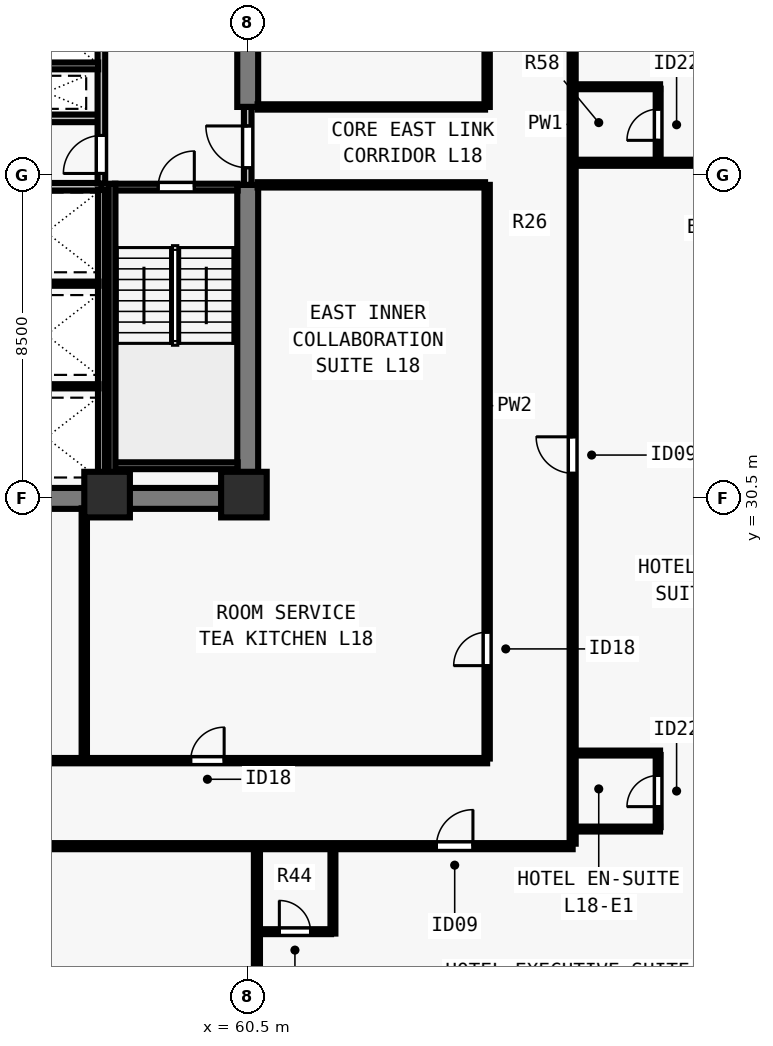
"""IFC4 building model, lengths in metres.
Left out: names, types, materials, properties, quantities, classifications, styles, units other than length and angle.
Written with IfcOpenShell. Run it as: python <this file> out.ifc"""

import sys

from ifc_helpers import new_model, si_unit, direction, frame, frame_2d, origin, origin_2d, place, context, subcontext, project, spatial, rectangle, extrude, element, fill, save


model = new_model("IFC4")
c1 = context("Model", 3, precision=1e-05, world=origin(), true_north=direction((0.0, 1.0)))
c2 = subcontext(c1, "Body", "Model", "MODEL_VIEW")
j1 = project(units=[si_unit("LENGTHUNIT", "METRE"), si_unit("PLANEANGLEUNIT", "RADIAN")], contexts=[c1])
p1 = place(None, origin())
s1 = spatial("IfcSite", under=j1, at=p1, CompositionType="ELEMENT")
p2 = place(p1, origin())
s2 = spatial("IfcBuilding", under=s1, at=p2, CompositionType="ELEMENT")
p3 = place(p2, frame((0.0, 0.0, 69.0)))
s3 = spatial("IfcBuildingStorey", under=s2, at=p3, CompositionType="ELEMENT", Elevation=69.0)
for number, where, z_axis, x_axis in (
    (1, (56.8, 30.6, 0.0), (0.0, 0.0, 1.0), (1.0, 0.0, 0.0)),
    (2, (60.4, 30.6, 0.0), (0.0, 0.0, 1.0), (1.0, 0.0, 0.0)),
):
    element("IfcColumn", number, at=place(p3, frame(where, z_axis=z_axis, x_axis=x_axis)), inside=s3, PredefinedType="COLUMN", context=c2, shape_type="SweptSolid", body=[
        extrude(rectangle(XDim=1.2, YDim=1.2, at=origin_2d()), origin(), (0.0, 0.0, 1.0), 3.5),
    ])
p4 = place(p3, frame((43.225, 30.5, 0.0), z_axis=(0.0, 0.0, 1.0), x_axis=(1.0, 0.0, 0.0)))
e3 = element("IfcWall", 3, at=p4, inside=s3, PredefinedType="SHEAR", context=c2, shape_type="SweptSolid", body=[
    extrude(rectangle(XDim=17.55, YDim=0.55, at=frame_2d((8.775, 0.0))), origin(), (0.0, 0.0, 1.0), 3.28),
])
p5 = place(p3, frame((60.5, 30.765, 0.0), z_axis=(0.0, 0.0, 1.0), x_axis=(0.0, 1.0, 0.0)))
e4 = element("IfcWall", 4, at=p5, inside=s3, PredefinedType="SHEAR", context=c2, shape_type="SweptSolid", body=[
    extrude(rectangle(XDim=7.985, YDim=0.55, at=frame_2d((3.993, 0.0))), origin(), (0.0, 0.0, 1.0), 3.28),
])
p6 = place(p3, frame((60.5, 40.8, 0.0), z_axis=(0.0, 0.0, 1.0), x_axis=(0.0, 1.0, 0.0)))
e5 = element("IfcWall", 5, at=p6, inside=s3, PredefinedType="SHEAR", context=c2, shape_type="SweptSolid", body=[
    extrude(rectangle(XDim=6.435, YDim=0.55, at=frame_2d((3.218, 0.0))), origin(), (0.0, 0.0, 1.0), 3.28),
])
for number, where, z_axis, x_axis in (
    (6, (53.7, 38.7, 0.0), (0.0, 0.0, 1.0), (1.0, 0.0, 0.0)),
    (7, (53.7, 40.5, 0.0), (0.0, 0.0, 1.0), (1.0, 0.0, 0.0)),
):
    element("IfcWall", number, at=place(p3, frame(where, z_axis=z_axis, x_axis=x_axis)), inside=s3, PredefinedType="SOLIDWALL", context=c2, shape_type="SweptSolid", body=[
        extrude(rectangle(XDim=2.95, YDim=0.2, at=frame_2d((1.475, 0.0))), origin(), (0.0, 0.0, 1.0), 3.28),
    ])
p7 = place(p3, frame((60.5, 38.75, 0.0), z_axis=(0.0, 0.0, 1.0), x_axis=(0.0, 1.0, 0.0)))
e8 = element("IfcWall", 8, at=p7, inside=s3, PredefinedType="SOLIDWALL", context=c2, shape_type="SweptSolid", body=[
    extrude(rectangle(XDim=2.05, YDim=0.2, at=frame_2d((1.025, 0.0))), origin(), (0.0, 0.0, 1.0), 3.28),
])
p8 = place(p7, frame((0.45, 0.0, 0.0)))
e9 = element("IfcOpeningElement", 9, at=p8, cuts=e8, PredefinedType="OPENING", context=c2, shape_type="SweptSolid", body=[
    extrude(rectangle(XDim=1.1, YDim=2.15, at=frame_2d((0.55, 1.075))), frame((0.0, 0.11, 0.0), z_axis=(0.0, -1.0, 0.0), x_axis=(1.0, 0.0, 0.0)), (0.0, 0.0, 1.0), 0.22),
])
p9 = place(p3, frame((56.65, 38.785, 0.0), z_axis=(0.0, 0.0, 1.0), x_axis=(0.0, 1.0, 0.0)))
e10 = element("IfcWall", 10, at=p9, inside=s3, PredefinedType="SOLIDWALL", context=c2, shape_type="SweptSolid", body=[
    extrude(rectangle(XDim=4.865, YDim=0.2, at=frame_2d((2.433, 0.0))), origin(), (0.0, 0.0, 1.0), 3.28),
])
p10 = place(p9, frame((0.265, 0.0, 0.0)))
e11 = element("IfcOpeningElement", 11, at=p10, cuts=e10, PredefinedType="OPENING", context=c2, shape_type="SweptSolid", body=[
    extrude(rectangle(XDim=1.0, YDim=2.15, at=frame_2d((0.5, 1.075))), frame((0.0, 0.11, 0.0), z_axis=(0.0, -1.0, 0.0), x_axis=(1.0, 0.0, 0.0)), (0.0, 0.0, 1.0), 0.22),
])
p11 = place(p3, frame((56.65, 30.76, 0.0), z_axis=(0.0, 0.0, 1.0), x_axis=(0.0, 1.0, 0.0)))
e12 = element("IfcWall", 12, at=p11, inside=s3, PredefinedType="SOLIDWALL", context=c2, shape_type="SweptSolid", body=[
    extrude(rectangle(XDim=7.855, YDim=0.18, at=frame_2d((3.927, 0.0))), origin(), (0.0, 0.0, 1.0), 3.28),
])
for number, where, z_axis, x_axis in (
    (13, (53.785, 33.45, 0.0), (0.0, 0.0, 1.0), (1.0, 0.0, 0.0)),
    (14, (53.785, 36.15, 0.0), (0.0, 0.0, 1.0), (1.0, 0.0, 0.0)),
):
    element("IfcWall", number, at=place(p3, frame(where, z_axis=z_axis, x_axis=x_axis)), inside=s3, PredefinedType="PARTITIONING", context=c2, shape_type="SweptSolid", body=[
        extrude(rectangle(XDim=2.79, YDim=0.11, at=frame_2d((1.395, 0.0))), origin(), (0.0, 0.0, 1.0), 3.28),
    ])
p12 = place(p3, frame((53.785, 41.88, 0.0), z_axis=(0.0, 0.0, 1.0), x_axis=(1.0, 0.0, 0.0)))
e15 = element("IfcWall", 15, at=p12, inside=s3, PredefinedType="SOLIDWALL", context=c2, shape_type="SweptSolid", body=[
    extrude(rectangle(XDim=2.78, YDim=0.18, at=frame_2d((1.39, 0.0))), origin(), (0.0, 0.0, 1.0), 3.28),
])
p13 = place(p3, frame((34.95, 21.35, 0.0), z_axis=(0.0, 0.0, 1.0), x_axis=(1.0, 0.0, 0.0)))
e16 = element("IfcWall", 16, at=p13, inside=s3, PredefinedType="PARTITIONING", context=c2, shape_type="SweptSolid", body=[
    extrude(rectangle(XDim=34.1, YDim=0.16, at=frame_2d((17.05, 0.0))), origin(), (0.0, 0.0, 1.0), 3.28),
])
p14 = place(p13, frame((3.614, 0.0, 0.0)))
e17 = element("IfcOpeningElement", 17, at=p14, cuts=e16, PredefinedType="OPENING", context=c2, shape_type="SweptSolid", body=[
    extrude(rectangle(XDim=0.96, YDim=2.15, at=frame_2d((0.48, 1.075))), frame((0.0, 0.09, 0.0), z_axis=(0.0, -1.0, 0.0), x_axis=(1.0, 0.0, 0.0)), (0.0, 0.0, 1.0), 0.18),
])
p15 = place(p13, frame((17.56, 0.0, 0.0)))
e18 = element("IfcOpeningElement", 18, at=p15, cuts=e16, PredefinedType="OPENING", context=c2, shape_type="SweptSolid", body=[
    extrude(rectangle(XDim=0.96, YDim=2.15, at=frame_2d((0.48, 1.075))), frame((0.0, 0.09, 0.0), z_axis=(0.0, -1.0, 0.0), x_axis=(1.0, 0.0, 0.0)), (0.0, 0.0, 1.0), 0.18),
])
p16 = place(p13, frame((30.516, 0.0, 0.0)))
e19 = element("IfcOpeningElement", 19, at=p16, cuts=e16, PredefinedType="OPENING", context=c2, shape_type="SweptSolid", body=[
    extrude(rectangle(XDim=0.96, YDim=2.15, at=frame_2d((0.48, 1.075))), frame((0.0, 0.09, 0.0), z_axis=(0.0, -1.0, 0.0), x_axis=(1.0, 0.0, 0.0)), (0.0, 0.0, 1.0), 0.18),
])
p17 = place(p3, frame((69.05, 21.415, 0.0), z_axis=(0.0, 0.0, 1.0), x_axis=(0.0, 1.0, 0.0)))
e20 = element("IfcWall", 20, at=p17, inside=s3, PredefinedType="PARTITIONING", context=c2, shape_type="SweptSolid", body=[
    extrude(rectangle(XDim=35.17, YDim=0.16, at=frame_2d((17.585, 0.0))), origin(), (0.0, 0.0, 1.0), 3.28),
])
p18 = place(p17, frame((9.746, 0.0, 0.0)))
e21 = element("IfcOpeningElement", 21, at=p18, cuts=e20, PredefinedType="OPENING", context=c2, shape_type="SweptSolid", body=[
    extrude(rectangle(XDim=0.96, YDim=2.15, at=frame_2d((0.48, 1.075))), frame((0.0, 0.09, 0.0), z_axis=(0.0, -1.0, 0.0), x_axis=(1.0, 0.0, 0.0)), (0.0, 0.0, 1.0), 0.18),
])
p19 = place(p17, frame((27.146, 0.0, 0.0)))
e22 = element("IfcOpeningElement", 22, at=p19, cuts=e20, PredefinedType="OPENING", context=c2, shape_type="SweptSolid", body=[
    extrude(rectangle(XDim=0.96, YDim=2.15, at=frame_2d((0.48, 1.075))), frame((0.0, 0.09, 0.0), z_axis=(0.0, -1.0, 0.0), x_axis=(1.0, 0.0, 0.0)), (0.0, 0.0, 1.0), 0.18),
])
p20 = place(p3, frame((37.2, 23.6, 0.0), z_axis=(0.0, 0.0, 1.0), x_axis=(1.0, 0.0, 0.0)))
e23 = element("IfcWall", 23, at=p20, inside=s3, PredefinedType="PARTITIONING", context=c2, shape_type="SweptSolid", body=[
    extrude(rectangle(XDim=29.6, YDim=0.14, at=frame_2d((14.8, 0.0))), origin(), (0.0, 0.0, 1.0), 3.28),
])
p21 = place(p20, frame((1.2, 0.0, 0.0)))
e24 = element("IfcOpeningElement", 24, at=p21, cuts=e23, PredefinedType="OPENING", context=c2, shape_type="SweptSolid", body=[
    extrude(rectangle(XDim=0.88, YDim=2.1, at=frame_2d((0.44, 1.05))), frame((0.0, 0.08, 0.0), z_axis=(0.0, -1.0, 0.0), x_axis=(1.0, 0.0, 0.0)), (0.0, 0.0, 1.0), 0.16),
])
p22 = place(p20, frame((11.3, 0.0, 0.0)))
e25 = element("IfcOpeningElement", 25, at=p22, cuts=e23, PredefinedType="OPENING", context=c2, shape_type="SweptSolid", body=[
    extrude(rectangle(XDim=0.88, YDim=2.1, at=frame_2d((0.44, 1.05))), frame((0.0, 0.08, 0.0), z_axis=(0.0, -1.0, 0.0), x_axis=(1.0, 0.0, 0.0)), (0.0, 0.0, 1.0), 0.16),
])
p23 = place(p20, frame((21.8, 0.0, 0.0)))
e26 = element("IfcOpeningElement", 26, at=p23, cuts=e23, PredefinedType="OPENING", context=c2, shape_type="SweptSolid", body=[
    extrude(rectangle(XDim=0.88, YDim=2.1, at=frame_2d((0.44, 1.05))), frame((0.0, 0.08, 0.0), z_axis=(0.0, -1.0, 0.0), x_axis=(1.0, 0.0, 0.0)), (0.0, 0.0, 1.0), 0.16),
])
p24 = place(p3, frame((66.8, 23.655, 0.0), z_axis=(0.0, 0.0, 1.0), x_axis=(0.0, 1.0, 0.0)))
e27 = element("IfcWall", 27, at=p24, inside=s3, PredefinedType="PARTITIONING", context=c2, shape_type="SweptSolid", body=[
    extrude(rectangle(XDim=15.095, YDim=0.14, at=frame_2d((7.547, 0.0))), origin(), (0.0, 0.0, 1.0), 3.28),
])
p25 = place(p24, frame((2.445, 0.0, 0.0)))
e28 = element("IfcOpeningElement", 28, at=p25, cuts=e27, PredefinedType="OPENING", context=c2, shape_type="SweptSolid", body=[
    extrude(rectangle(XDim=0.88, YDim=2.1, at=frame_2d((0.44, 1.05))), frame((0.0, 0.08, 0.0), z_axis=(0.0, -1.0, 0.0), x_axis=(1.0, 0.0, 0.0)), (0.0, 0.0, 1.0), 0.16),
])
p26 = place(p3, frame((66.8, 40.8, 0.0), z_axis=(0.0, 0.0, 1.0), x_axis=(0.0, 1.0, 0.0)))
e29 = element("IfcWall", 29, at=p26, inside=s3, PredefinedType="PARTITIONING", context=c2, shape_type="SweptSolid", body=[
    extrude(rectangle(XDim=13.545, YDim=0.14, at=frame_2d((6.772, 0.0))), origin(), (0.0, 0.0, 1.0), 3.28),
])
p27 = place(p26, frame((2.5, 0.0, 0.0)))
e30 = element("IfcOpeningElement", 30, at=p27, cuts=e29, PredefinedType="OPENING", context=c2, shape_type="SweptSolid", body=[
    extrude(rectangle(XDim=0.88, YDim=2.1, at=frame_2d((0.44, 1.05))), frame((0.0, 0.08, 0.0), z_axis=(0.0, -1.0, 0.0), x_axis=(1.0, 0.0, 0.0)), (0.0, 0.0, 1.0), 0.16),
])
for number, where, z_axis, x_axis in (
    (31, (60.76, 38.75, 0.0), (0.0, 0.0, 1.0), (1.0, 0.0, 0.0)),
    (32, (60.76, 40.8, 0.0), (0.0, 0.0, 1.0), (1.0, 0.0, 0.0)),
):
    element("IfcWall", number, at=place(p3, frame(where, z_axis=z_axis, x_axis=x_axis)), inside=s3, PredefinedType="PARTITIONING", context=c2, shape_type="SweptSolid", body=[
        extrude(rectangle(XDim=5.985, YDim=0.14, at=frame_2d((2.993, 0.0))), origin(), (0.0, 0.0, 1.0), 3.28),
    ])
p28 = place(p3, frame((56.2, 23.655, 0.0), z_axis=(0.0, 0.0, 1.0), x_axis=(0.0, 1.0, 0.0)))
e33 = element("IfcWall", 33, at=p28, inside=s3, PredefinedType="PARTITIONING", context=c2, shape_type="SweptSolid", body=[
    extrude(rectangle(XDim=6.585, YDim=0.14, at=frame_2d((3.292, 0.0))), origin(), (0.0, 0.0, 1.0), 2.849),
])
p29 = place(p3, frame((60.742, 13.845, 0.0), z_axis=(0.0, 0.0, 1.0), x_axis=(0.0, 1.0, 0.0)))
e34 = element("IfcWall", 34, at=p29, inside=s3, PredefinedType="PARTITIONING", context=c2, shape_type="SweptSolid", body=[
    extrude(rectangle(XDim=7.44, YDim=0.16, at=frame_2d((3.72, 0.0))), origin(), (0.0, 0.0, 1.0), 3.28),
])
p30 = place(p3, frame((62.742, 19.05, 0.0), z_axis=(0.0, 0.0, 1.0), x_axis=(0.0, 1.0, 0.0)))
e35 = element("IfcWall", 35, at=p30, inside=s3, PredefinedType="PLUMBINGWALL", context=c2, shape_type="SweptSolid", body=[
    extrude(rectangle(XDim=2.235, YDim=0.13, at=frame_2d((1.117, 0.0))), origin(), (0.0, 0.0, 1.0), 3.28),
])
p31 = place(p3, frame((60.808, 19.1, 0.0), z_axis=(0.0, 0.0, 1.0), x_axis=(1.0, 0.0, 0.0)))
e36 = element("IfcWall", 36, at=p31, inside=s3, PredefinedType="PLUMBINGWALL", context=c2, shape_type="SweptSolid", body=[
    extrude(rectangle(XDim=1.885, YDim=0.13, at=frame_2d((0.942, 0.0))), origin(), (0.0, 0.0, 1.0), 3.28),
])
p32 = place(p31, frame((0.525, 0.0, 0.0)))
e37 = element("IfcOpeningElement", 37, at=p32, cuts=e36, PredefinedType="OPENING", context=c2, shape_type="SweptSolid", body=[
    extrude(rectangle(XDim=0.82, YDim=2.1, at=frame_2d((0.41, 1.05))), frame((0.0, 0.075, 0.0), z_axis=(0.0, -1.0, 0.0), x_axis=(1.0, 0.0, 0.0)), (0.0, 0.0, 1.0), 0.15),
])
p33 = place(p3, frame((69.115, 21.8, 0.0), z_axis=(0.0, 0.0, 1.0), x_axis=(1.0, 0.0, 0.0)))
e38 = element("IfcWall", 38, at=p33, inside=s3, PredefinedType="PLUMBINGWALL", context=c2, shape_type="SweptSolid", body=[
    extrude(rectangle(XDim=2.235, YDim=0.13, at=frame_2d((1.118, 0.0))), origin(), (0.0, 0.0, 1.0), 2.849),
])
p34 = place(p3, frame((69.115, 23.8, 0.0), z_axis=(0.0, 0.0, 1.0), x_axis=(1.0, 0.0, 0.0)))
e39 = element("IfcWall", 39, at=p34, inside=s3, PredefinedType="PLUMBINGWALL", context=c2, shape_type="SweptSolid", body=[
    extrude(rectangle(XDim=2.235, YDim=0.13, at=frame_2d((1.118, 0.0))), origin(), (0.0, 0.0, 1.0), 3.28),
])
p35 = place(p3, frame((71.3, 21.85, 0.0), z_axis=(0.0, 0.0, 1.0), x_axis=(0.0, 1.0, 0.0)))
e40 = element("IfcWall", 40, at=p35, inside=s3, PredefinedType="PLUMBINGWALL", context=c2, shape_type="SweptSolid", body=[
    extrude(rectangle(XDim=1.9, YDim=0.13, at=frame_2d((0.95, 0.0))), origin(), (0.0, 0.0, 1.0), 3.28),
])
p36 = place(p35, frame((0.54, 0.0, 0.0)))
e41 = element("IfcOpeningElement", 41, at=p36, cuts=e40, PredefinedType="OPENING", context=c2, shape_type="SweptSolid", body=[
    extrude(rectangle(XDim=0.82, YDim=2.1, at=frame_2d((0.41, 1.05))), frame((0.0, 0.075, 0.0), z_axis=(0.0, -1.0, 0.0), x_axis=(1.0, 0.0, 0.0)), (0.0, 0.0, 1.0), 0.15),
])
p37 = place(p3, frame((69.115, 39.332, 0.0), z_axis=(0.0, 0.0, 1.0), x_axis=(1.0, 0.0, 0.0)))
e42 = element("IfcWall", 42, at=p37, inside=s3, PredefinedType="PARTITIONING", context=c2, shape_type="SweptSolid", body=[
    extrude(rectangle(XDim=8.115, YDim=0.16, at=frame_2d((4.058, 0.0))), origin(), (0.0, 0.0, 1.0), 3.28),
])
p38 = place(p3, frame((69.115, 41.332, 0.0), z_axis=(0.0, 0.0, 1.0), x_axis=(1.0, 0.0, 0.0)))
e43 = element("IfcWall", 43, at=p38, inside=s3, PredefinedType="PLUMBINGWALL", context=c2, shape_type="SweptSolid", body=[
    extrude(rectangle(XDim=2.235, YDim=0.13, at=frame_2d((1.118, 0.0))), origin(), (0.0, 0.0, 1.0), 3.28),
])
p39 = place(p3, frame((71.3, 39.396, 0.0), z_axis=(0.0, 0.0, 1.0), x_axis=(0.0, 1.0, 0.0)))
e44 = element("IfcWall", 44, at=p39, inside=s3, PredefinedType="PLUMBINGWALL", context=c2, shape_type="SweptSolid", body=[
    extrude(rectangle(XDim=1.885, YDim=0.13, at=frame_2d((0.942, 0.0))), origin(), (0.0, 0.0, 1.0), 3.28),
])
p40 = place(p39, frame((0.525, 0.0, 0.0)))
e45 = element("IfcOpeningElement", 45, at=p40, cuts=e44, PredefinedType="OPENING", context=c2, shape_type="SweptSolid", body=[
    extrude(rectangle(XDim=0.82, YDim=2.1, at=frame_2d((0.41, 1.05))), frame((0.0, 0.075, 0.0), z_axis=(0.0, -1.0, 0.0), x_axis=(1.0, 0.0, 0.0)), (0.0, 0.0, 1.0), 0.15),
])
p41 = place(p3, frame((57.005, 38.69, 0.0), z_axis=(0.0, 0.0, 1.0), x_axis=(1.0, 0.0, 0.0)))
e46 = element("IfcWall", 46, at=p41, inside=s3, PredefinedType="SOLIDWALL", context=c2, shape_type="SweptSolid", body=[
    extrude(rectangle(XDim=3.23, YDim=0.18, at=frame_2d((1.615, 0.0))), origin(), (0.0, 0.0, 1.0), 3.28),
])
p42 = place(p41, frame((1.14, 0.0, 0.0)))
e47 = element("IfcOpeningElement", 47, at=p42, cuts=e46, PredefinedType="OPENING", context=c2, shape_type="SweptSolid", body=[
    extrude(rectangle(XDim=0.95, YDim=2.15, at=frame_2d((0.475, 1.075))), frame((0.0, 0.1, 0.0), z_axis=(0.0, -1.0, 0.0), x_axis=(1.0, 0.0, 0.0)), (0.0, 0.0, 1.0), 0.2),
])
p43 = place(p3, frame((57.005, 31.36, 0.0), z_axis=(0.0, 0.0, 1.0), x_axis=(1.0, 0.0, 0.0)))
e48 = element("IfcWall", 48, at=p43, inside=s3, PredefinedType="SOLIDWALL", context=c2, shape_type="SweptSolid", body=[
    extrude(rectangle(XDim=3.23, YDim=0.18, at=frame_2d((1.615, 0.0))), origin(), (0.0, 0.0, 1.0), 3.28),
])
p44 = place(p3, frame((56.93, 38.78, 0.0), z_axis=(0.0, 0.0, 1.0), x_axis=(0.0, -1.0, 0.0)))
e49 = element("IfcWall", 49, at=p44, inside=s3, PredefinedType="SOLIDWALL", context=c2, shape_type="SweptSolid", body=[
    extrude(rectangle(XDim=8.017, YDim=0.18, at=frame_2d((4.009, 0.0))), origin(), (0.0, 0.0, 1.0), 3.28),
])
p45 = place(p8, origin())
e50 = element("IfcDoor", 50, at=p45, inside=s3, OperationType="SINGLE_SWING_RIGHT", PredefinedType="DOOR", context=c2, shape_type="SweptSolid", body=[
    extrude(rectangle(XDim=1.1, YDim=2.15, at=frame_2d((0.55, 1.075))), frame((0.0, 0.025, 0.0), z_axis=(0.0, -1.0, 0.0), x_axis=(1.0, 0.0, 0.0)), (0.0, 0.0, 1.0), 0.05),
])
fill(e9, e50)
p46 = place(p10, origin())
e51 = element("IfcDoor", 51, at=p46, inside=s3, OperationType="SINGLE_SWING_LEFT", PredefinedType="DOOR", context=c2, shape_type="SweptSolid", body=[
    extrude(rectangle(XDim=1.0, YDim=2.15, at=frame_2d((0.5, 1.075))), frame((0.0, 0.025, 0.0), z_axis=(0.0, -1.0, 0.0), x_axis=(1.0, 0.0, 0.0)), (0.0, 0.0, 1.0), 0.05),
])
fill(e11, e51)
p47 = place(p23, origin())
e52 = element("IfcDoor", 52, at=p47, inside=s3, OperationType="SINGLE_SWING_RIGHT", PredefinedType="DOOR", context=c2, shape_type="SweptSolid", body=[
    extrude(rectangle(XDim=0.88, YDim=2.1, at=frame_2d((0.44, 1.05))), frame((0.0, 0.025, 0.0), z_axis=(0.0, -1.0, 0.0), x_axis=(1.0, 0.0, 0.0)), (0.0, 0.0, 1.0), 0.05),
])
fill(e26, e52)
p48 = place(p25, origin())
e53 = element("IfcDoor", 53, at=p48, inside=s3, OperationType="SINGLE_SWING_LEFT", PredefinedType="DOOR", context=c2, shape_type="SweptSolid", body=[
    extrude(rectangle(XDim=0.88, YDim=2.1, at=frame_2d((0.44, 1.05))), frame((0.0, 0.025, 0.0), z_axis=(0.0, -1.0, 0.0), x_axis=(1.0, 0.0, 0.0)), (0.0, 0.0, 1.0), 0.05),
])
fill(e28, e53)
p49 = place(p32, origin())
e54 = element("IfcDoor", 54, at=p49, inside=s3, OperationType="SINGLE_SWING_LEFT", PredefinedType="DOOR", context=c2, shape_type="SweptSolid", body=[
    extrude(rectangle(XDim=0.82, YDim=2.1, at=frame_2d((0.41, 1.05))), frame((0.0, 0.025, 0.0), z_axis=(0.0, -1.0, 0.0), x_axis=(1.0, 0.0, 0.0)), (0.0, 0.0, 1.0), 0.05),
])
fill(e37, e54)
p50 = place(p16, origin())
e55 = element("IfcDoor", 55, at=p50, inside=s3, OperationType="SINGLE_SWING_RIGHT", PredefinedType="DOOR", context=c2, shape_type="SweptSolid", body=[
    extrude(rectangle(XDim=0.96, YDim=2.15, at=frame_2d((0.48, 1.075))), frame((0.0, 0.025, 0.0), z_axis=(0.0, -1.0, 0.0), x_axis=(1.0, 0.0, 0.0)), (0.0, 0.0, 1.0), 0.05),
])
fill(e19, e55)
p51 = place(p36, origin())
e56 = element("IfcDoor", 56, at=p51, inside=s3, OperationType="SINGLE_SWING_LEFT", PredefinedType="DOOR", context=c2, shape_type="SweptSolid", body=[
    extrude(rectangle(XDim=0.82, YDim=2.1, at=frame_2d((0.41, 1.05))), frame((0.0, 0.025, 0.0), z_axis=(0.0, -1.0, 0.0), x_axis=(1.0, 0.0, 0.0)), (0.0, 0.0, 1.0), 0.05),
])
fill(e41, e56)
p52 = place(p18, origin())
e57 = element("IfcDoor", 57, at=p52, inside=s3, OperationType="SINGLE_SWING_RIGHT", PredefinedType="DOOR", context=c2, shape_type="SweptSolid", body=[
    extrude(rectangle(XDim=0.96, YDim=2.15, at=frame_2d((0.48, 1.075))), frame((0.0, 0.025, 0.0), z_axis=(0.0, -1.0, 0.0), x_axis=(1.0, 0.0, 0.0)), (0.0, 0.0, 1.0), 0.05),
])
fill(e21, e57)
p53 = place(p40, origin())
e58 = element("IfcDoor", 58, at=p53, inside=s3, OperationType="SINGLE_SWING_LEFT", PredefinedType="DOOR", context=c2, shape_type="SweptSolid", body=[
    extrude(rectangle(XDim=0.82, YDim=2.1, at=frame_2d((0.41, 1.05))), frame((0.0, 0.025, 0.0), z_axis=(0.0, -1.0, 0.0), x_axis=(1.0, 0.0, 0.0)), (0.0, 0.0, 1.0), 0.05),
])
fill(e45, e58)
p54 = place(p42, origin())
e59 = element("IfcDoor", 59, at=p54, inside=s3, OperationType="SINGLE_SWING_RIGHT", PredefinedType="DOOR", context=c2, shape_type="SweptSolid", body=[
    extrude(rectangle(XDim=0.95, YDim=2.15, at=frame_2d((0.475, 1.075))), frame((0.0, 0.025, 0.0), z_axis=(0.0, -1.0, 0.0), x_axis=(1.0, 0.0, 0.0)), (0.0, 0.0, 1.0), 0.05),
])
fill(e47, e59)
save(model, sys.argv[1])
